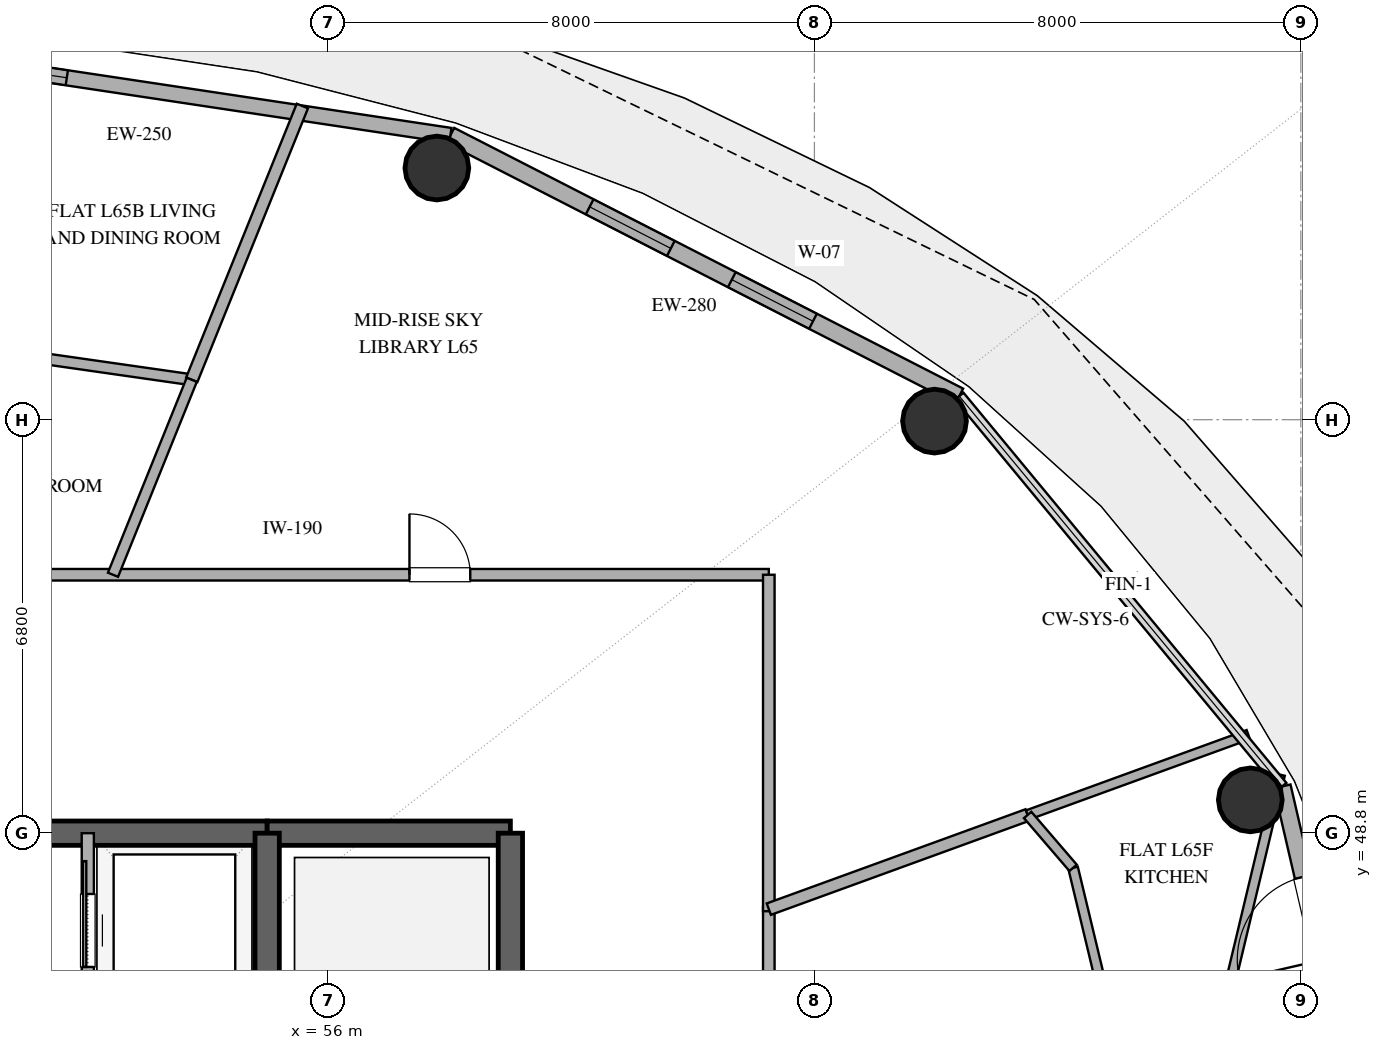
"""IFC4 building model, lengths in metres.
Left out: names, types, materials, properties, quantities, classifications, styles, units other than length and angle.
Written with IfcOpenShell. Run it as: python <this file> out.ifc"""

import sys

from ifc_helpers import new_model, si_unit, direction, frame, frame_2d, origin, origin_2d, place, context, subcontext, project, spatial, rectangle, hollow_circle, extrude, element, fill, save


model = new_model("IFC4")
c1 = context("Model", 3, precision=1e-05, world=origin(), true_north=direction((0.0, 1.0)))
c2 = subcontext(c1, "Body", "Model", "MODEL_VIEW")
j1 = project(units=[si_unit("LENGTHUNIT", "METRE"), si_unit("PLANEANGLEUNIT", "RADIAN")], contexts=[c1])
p1 = place(None, origin())
s1 = spatial("IfcSite", under=j1, at=p1, CompositionType="ELEMENT")
p2 = place(p1, origin())
s2 = spatial("IfcBuilding", under=s1, at=p2, CompositionType="ELEMENT")
p3 = place(p2, frame((0.0, 0.0, 253.2)))
s3 = spatial("IfcBuildingStorey", under=s2, at=p3, CompositionType="ELEMENT", Elevation=253.2)
p4 = place(p3, frame((41.0, 48.8, 0.0), z_axis=(0.0, 0.0, 1.0), x_axis=(1.0, 0.0, 0.0)))
e1 = element("IfcWall", 1, at=p4, inside=s3, PredefinedType="SHEAR", context=c2, shape_type="SweptSolid", body=[
    extrude(rectangle(XDim=14.0, YDim=0.4, at=frame_2d((7.0, 0.0))), origin(), (0.0, 0.0, 1.0), 3.25),
])
p5 = place(p4, frame((6.1, 0.0, 0.0)))
e2 = element("IfcOpeningElement", 2, at=p5, cuts=e1, PredefinedType="OPENING", context=c2, shape_type="SweptSolid", body=[
    extrude(rectangle(XDim=1.8, YDim=2.25, at=frame_2d((0.9, 1.125))), frame((0.0, 0.21, 0.0), z_axis=(0.0, -1.0, 0.0), x_axis=(1.0, 0.0, 0.0)), (0.0, 0.0, 1.0), 0.42),
])
p6 = place(p3, frame((55.0, 48.8, 0.0), z_axis=(0.0, 0.0, 1.0), x_axis=(1.0, 0.0, 0.0)))
e3 = element("IfcWall", 3, at=p6, inside=s3, PredefinedType="SHEAR", context=c2, shape_type="SweptSolid", body=[
    extrude(rectangle(XDim=4.0, YDim=0.4, at=frame_2d((2.0, 0.0))), origin(), (0.0, 0.0, 1.0), 3.25),
])
p7 = place(p3, frame((59.0, 35.2, 0.0), z_axis=(0.0, 0.0, 1.0), x_axis=(0.0, 1.0, 0.0)))
e4 = element("IfcWall", 4, at=p7, inside=s3, PredefinedType="SHEAR", context=c2, shape_type="SweptSolid", body=[
    extrude(rectangle(XDim=13.6, YDim=0.4, at=frame_2d((6.8, 0.0))), origin(), (0.0, 0.0, 1.0), 3.25),
])
p8 = place(p3, frame((55.0, 35.2, 0.0), z_axis=(0.0, 0.0, 1.0), x_axis=(0.0, 1.0, 0.0)))
e5 = element("IfcWall", 5, at=p8, inside=s3, PredefinedType="SHEAR", context=c2, shape_type="SweptSolid", body=[
    extrude(rectangle(XDim=13.6, YDim=0.4, at=frame_2d((6.8, 0.0))), origin(), (0.0, 0.0, 1.0), 3.25),
])
p9 = place(p8, frame((1.15, 0.0, 0.0)))
e6 = element("IfcOpeningElement", 6, at=p9, cuts=e5, PredefinedType="OPENING", context=c2, shape_type="SweptSolid", body=[
    extrude(rectangle(XDim=1.1, YDim=2.2, at=frame_2d((0.55, 1.1))), frame((0.0, 0.21, 0.0), z_axis=(0.0, -1.0, 0.0), x_axis=(1.0, 0.0, 0.0)), (0.0, 0.0, 1.0), 0.42),
])
for number, where, z_axis, x_axis in (
    (7, (71.169, 49.347, 0.0), (0.0, 0.0, 1.0), (1.0, 0.0, 0.0)),
    (8, (65.975, 55.576, 0.0), (0.0, 0.0, 1.0), (1.0, 0.0, 0.0)),
    (9, (57.791, 59.739, 0.0), (0.0, 0.0, 1.0), (1.0, 0.0, 0.0)),
):
    element("IfcColumn", number, at=place(p3, frame(where, z_axis=z_axis, x_axis=x_axis)), inside=s3, PredefinedType="COLUMN", context=c2, shape_type="SweptSolid", body=[
        extrude(hollow_circle(Radius=0.525, WallThickness=0.028, at=origin_2d()), origin(), (0.0, 0.0, 1.0), 3.25),
    ])
p10 = place(p3, frame((73.447, 42.0, 0.0), z_axis=(0.0, 0.0, 1.0), x_axis=(-0.225635078214, 0.974211892495, 0.0)))
e10 = element("IfcWall", 10, at=p10, inside=s3, PredefinedType="SOLIDWALL", context=c2, shape_type="SweptSolid", body=[
    extrude(rectangle(XDim=7.77, YDim=0.28, at=frame_2d((3.885, 0.0))), origin(), (0.0, 0.0, 1.0), 3.25),
])
p11 = place(p10, frame((4.842, 0.0, 0.0)))
e11 = element("IfcOpeningElement", 11, at=p11, cuts=e10, PredefinedType="OPENING", context=c2, shape_type="SweptSolid", body=[
    extrude(rectangle(XDim=1.4, YDim=2.2, at=frame_2d((0.7, 1.1))), frame((0.0, 0.15, 0.0), z_axis=(0.0, -1.0, 0.0), x_axis=(1.0, 0.0, 0.0)), (0.0, 0.0, 1.0), 0.3),
])
p12 = place(p3, frame((66.383, 55.987, 0.0), z_axis=(0.0, 0.0, 1.0), x_axis=(-0.890007394051, 0.455946091699, 0.0)))
e12 = element("IfcWall", 12, at=p12, inside=s3, PredefinedType="SOLIDWALL", context=c2, shape_type="SweptSolid", body=[
    extrude(rectangle(XDim=9.404, YDim=0.28, at=frame_2d((4.702, 0.0))), origin(), (0.0, 0.0, 1.0), 3.25),
])
p13 = place(p12, frame((2.703, 0.0, 0.85)))
e13 = element("IfcOpeningElement", 13, at=p13, cuts=e12, PredefinedType="OPENING", context=c2, shape_type="SweptSolid", body=[
    extrude(rectangle(XDim=1.5, YDim=1.8, at=frame_2d((0.75, 0.9))), frame((0.0, 0.15, 0.0), z_axis=(0.0, -1.0, 0.0), x_axis=(1.0, 0.0, 0.0)), (0.0, 0.0, 1.0), 0.3),
])
p14 = place(p12, frame((5.33, 0.0, 0.85)))
e14 = element("IfcOpeningElement", 14, at=p14, cuts=e12, PredefinedType="OPENING", context=c2, shape_type="SweptSolid", body=[
    extrude(rectangle(XDim=1.5, YDim=1.8, at=frame_2d((0.75, 0.9))), frame((0.0, 0.15, 0.0), z_axis=(0.0, -1.0, 0.0), x_axis=(1.0, 0.0, 0.0)), (0.0, 0.0, 1.0), 0.3),
])
p15 = place(p3, frame((58.013, 60.274, 0.0), z_axis=(0.0, 0.0, 1.0), x_axis=(-0.988882522213, 0.148698881169, 0.0)))
e15 = element("IfcWall", 15, at=p15, inside=s3, PredefinedType="SOLIDWALL", context=c2, shape_type="SweptSolid", body=[
    extrude(rectangle(XDim=10.125, YDim=0.25, at=frame_2d((5.062, 0.0))), origin(), (0.0, 0.0, 1.0), 3.25),
])
p16 = place(p15, frame((6.379, 0.0, 1.42)))
e16 = element("IfcOpeningElement", 16, at=p16, cuts=e15, PredefinedType="OPENING", context=c2, shape_type="SweptSolid", body=[
    extrude(rectangle(XDim=1.0, YDim=1.05, at=frame_2d((0.5, 0.525))), frame((0.0, 0.135, 0.0), z_axis=(0.0, -1.0, 0.0), x_axis=(1.0, 0.0, 0.0)), (0.0, 0.0, 1.0), 0.27),
])
p17 = place(p3, frame((52.05, 38.4, 0.0), z_axis=(0.0, 0.0, 1.0), x_axis=(0.0, 1.0, 0.0)))
e17 = element("IfcWall", 17, at=p17, inside=s3, PredefinedType="SOLIDWALL", context=c2, shape_type="SweptSolid", body=[
    extrude(rectangle(XDim=10.4, YDim=0.2, at=frame_2d((5.2, 0.0))), origin(), (0.0, 0.0, 1.0), 2.61),
])
p18 = place(p17, frame((0.7, 0.0, 0.0)))
e18 = element("IfcOpeningElement", 18, at=p18, cuts=e17, PredefinedType="OPENING", context=c2, shape_type="SweptSolid", body=[
    extrude(rectangle(XDim=1.1, YDim=2.2, at=frame_2d((0.55, 1.1))), frame((0.0, 0.11, 0.0), z_axis=(0.0, -1.0, 0.0), x_axis=(1.0, 0.0, 0.0)), (0.0, 0.0, 1.0), 0.22),
])
p19 = place(p17, frame((8.2, 0.0, 0.0)))
e19 = element("IfcOpeningElement", 19, at=p19, cuts=e17, PredefinedType="OPENING", context=c2, shape_type="SweptSolid", body=[
    extrude(rectangle(XDim=1.2, YDim=2.2, at=frame_2d((0.6, 1.1))), frame((0.0, 0.11, 0.0), z_axis=(0.0, -1.0, 0.0), x_axis=(1.0, 0.0, 0.0)), (0.0, 0.0, 1.0), 0.22),
])
p20 = place(p3, frame((71.658, 49.763, 0.0), z_axis=(0.0, 0.0, 1.0), x_axis=(-0.23242816807, -0.972613564931, 0.0)))
e20 = element("IfcWall", 20, at=p20, inside=s3, PredefinedType="PLUMBINGWALL", context=c2, shape_type="SweptSolid", body=[
    extrude(rectangle(XDim=13.049, YDim=0.16, at=frame_2d((6.524, 0.0))), origin(), (0.0, 0.0, 1.0), 2.61),
])
p21 = place(p20, frame((6.135, 0.0, 0.0)))
e21 = element("IfcOpeningElement", 21, at=p21, cuts=e20, PredefinedType="OPENING", context=c2, shape_type="SweptSolid", body=[
    extrude(rectangle(XDim=0.9, YDim=2.1, at=frame_2d((0.45, 1.05))), frame((0.0, 0.09, 0.0), z_axis=(0.0, -1.0, 0.0), x_axis=(1.0, 0.0, 0.0)), (0.0, 0.0, 1.0), 0.18),
])
p22 = place(p3, frame((47.582, 53.05, 0.0), z_axis=(0.0, 0.0, 1.0), x_axis=(1.0, 0.0, 0.0)))
e22 = element("IfcWall", 22, at=p22, inside=s3, PredefinedType="PARTITIONING", context=c2, shape_type="SweptSolid", body=[
    extrude(rectangle(XDim=15.668, YDim=0.19, at=frame_2d((7.834, 0.0))), origin(), (0.0, 0.0, 1.0), 2.61),
])
p23 = place(p22, frame((9.758, 0.0, 0.0)))
e23 = element("IfcOpeningElement", 23, at=p23, cuts=e22, PredefinedType="OPENING", context=c2, shape_type="SweptSolid", body=[
    extrude(rectangle(XDim=1.0, YDim=2.2, at=frame_2d((0.5, 1.1))), frame((0.0, 0.105, 0.0), z_axis=(0.0, -1.0, 0.0), x_axis=(1.0, 0.0, 0.0)), (0.0, 0.0, 1.0), 0.21),
])
p24 = place(p3, frame((63.25, 47.585, 0.0), z_axis=(0.0, 0.0, 1.0), x_axis=(0.0, -1.0, 0.0)))
e24 = element("IfcWall", 24, at=p24, inside=s3, PredefinedType="PARTITIONING", context=c2, shape_type="SweptSolid", body=[
    extrude(rectangle(XDim=16.635, YDim=0.19, at=frame_2d((8.317, 0.0))), origin(), (0.0, 0.0, 1.0), 2.61),
])
p25 = place(p3, frame((69.753, 42.0, 0.0), z_axis=(0.0, 0.0, 1.0), x_axis=(-0.233901777694, 0.972260231827, 0.0)))
e25 = element("IfcWall", 25, at=p25, inside=s3, PredefinedType="PLUMBINGWALL", context=c2, shape_type="SweptSolid", body=[
    extrude(rectangle(XDim=6.408, YDim=0.16, at=frame_2d((3.204, 0.0))), origin(), (0.0, 0.0, 1.0), 2.61),
])
p26 = place(p3, frame((48.0, 57.08, 0.0), z_axis=(0.0, 0.0, 1.0), x_axis=(0.98992178104, -0.141615209012, 0.0)))
e26 = element("IfcWall", 26, at=p26, inside=s3, PredefinedType="PLUMBINGWALL", context=c2, shape_type="SweptSolid", body=[
    extrude(rectangle(XDim=5.818, YDim=0.18, at=frame_2d((2.909, 0.0))), origin(), (0.0, 0.0, 1.0), 2.61),
])
p27 = place(p26, frame((2.484, 0.0, 0.0)))
e27 = element("IfcOpeningElement", 27, at=p27, cuts=e26, PredefinedType="OPENING", context=c2, shape_type="SweptSolid", body=[
    extrude(rectangle(XDim=0.85, YDim=2.1, at=frame_2d((0.425, 1.05))), frame((0.0, 0.1, 0.0), z_axis=(0.0, -1.0, 0.0), x_axis=(1.0, 0.0, 0.0)), (0.0, 0.0, 1.0), 0.2),
])
p28 = place(p3, frame((63.25, 53.05, 0.0), z_axis=(0.0, 0.0, 1.0), x_axis=(0.0, -1.0, 0.0)))
e28 = element("IfcWall", 28, at=p28, inside=s3, PredefinedType="PARTITIONING", context=c2, shape_type="SweptSolid", body=[
    extrude(rectangle(XDim=5.534, YDim=0.19, at=frame_2d((2.767, 0.0))), origin(), (0.0, 0.0, 1.0), 2.61),
])
p29 = place(p3, frame((55.579, 60.758, 0.0), z_axis=(0.0, 0.0, 1.0), x_axis=(-0.374621823663, -0.927177701002, 0.0)))
e29 = element("IfcWall", 29, at=p29, inside=s3, PredefinedType="PARTITIONING", context=c2, shape_type="SweptSolid", body=[
    extrude(rectangle(XDim=4.856, YDim=0.2, at=frame_2d((2.428, 0.0))), origin(), (0.0, 0.0, 1.0), 2.61),
])
p30 = place(p3, frame((63.25, 47.551, 0.0), z_axis=(0.0, 0.0, 1.0), x_axis=(0.939695825247, 0.342011339012, 0.0)))
e30 = element("IfcWall", 30, at=p30, inside=s3, PredefinedType="PARTITIONING", context=c2, shape_type="SweptSolid", body=[
    extrude(rectangle(XDim=4.53, YDim=0.2, at=frame_2d((2.265, 0.0))), origin(), (0.0, 0.0, 1.0), 2.61),
])
p31 = place(p3, frame((67.507, 49.1, 0.0), z_axis=(0.0, 0.0, 1.0), x_axis=(0.939701103556, 0.341996836208, 0.0)))
e31 = element("IfcWall", 31, at=p31, inside=s3, PredefinedType="PLUMBINGWALL", context=c2, shape_type="SweptSolid", body=[
    extrude(rectangle(XDim=3.862, YDim=0.16, at=frame_2d((1.931, 0.0))), origin(), (0.0, 0.0, 1.0), 2.61),
])
p32 = place(p3, frame((53.76, 56.256, 0.0), z_axis=(0.0, 0.0, 1.0), x_axis=(-0.374565779855, -0.927200343271, 0.0)))
e32 = element("IfcWall", 32, at=p32, inside=s3, PredefinedType="PLUMBINGWALL", context=c2, shape_type="SweptSolid", body=[
    extrude(rectangle(XDim=3.458, YDim=0.18, at=frame_2d((1.729, 0.0))), origin(), (0.0, 0.0, 1.0), 2.61),
])
p33 = place(p3, frame((68.255, 48.23, 0.0), z_axis=(0.0, 0.0, 1.0), x_axis=(-0.651894891584, 0.758309336832, 0.0)))
e33 = element("IfcWall", 33, at=p33, inside=s3, PredefinedType="PLUMBINGWALL", context=c2, shape_type="SweptSolid", body=[
    extrude(rectangle(XDim=1.147, YDim=0.16, at=frame_2d((0.574, 0.0))), origin(), (0.0, 0.0, 1.0), 2.61),
])
p34 = place(p11, origin())
e34 = element("IfcDoor", 34, at=p34, inside=s3, OperationType="SINGLE_SWING_LEFT", PredefinedType="DOOR", context=c2, shape_type="SweptSolid", body=[
    extrude(rectangle(XDim=1.4, YDim=2.2, at=frame_2d((0.7, 1.1))), frame((0.0, 0.025, 0.0), z_axis=(0.0, -1.0, 0.0), x_axis=(1.0, 0.0, 0.0)), (0.0, 0.0, 1.0), 0.05),
])
fill(e11, e34)
p35 = place(p13, origin())
e35 = element("IfcWindow", 35, at=p35, inside=s3, PartitioningType="SINGLE_PANEL", PredefinedType="WINDOW", context=c2, shape_type="SweptSolid", body=[
    extrude(rectangle(XDim=1.5, YDim=1.8, at=frame_2d((0.75, 0.9))), frame((0.0, 0.03, 0.0), z_axis=(0.0, -1.0, 0.0), x_axis=(1.0, 0.0, 0.0)), (0.0, 0.0, 1.0), 0.06),
])
fill(e13, e35)
p36 = place(p14, origin())
e36 = element("IfcWindow", 36, at=p36, inside=s3, PartitioningType="SINGLE_PANEL", PredefinedType="WINDOW", context=c2, shape_type="SweptSolid", body=[
    extrude(rectangle(XDim=1.5, YDim=1.8, at=frame_2d((0.75, 0.9))), frame((0.0, 0.03, 0.0), z_axis=(0.0, -1.0, 0.0), x_axis=(1.0, 0.0, 0.0)), (0.0, 0.0, 1.0), 0.06),
])
fill(e14, e36)
p37 = place(p16, origin())
e37 = element("IfcWindow", 37, at=p37, inside=s3, PartitioningType="SINGLE_PANEL", PredefinedType="WINDOW", context=c2, shape_type="SweptSolid", body=[
    extrude(rectangle(XDim=1.0, YDim=1.05, at=frame_2d((0.5, 0.525))), frame((0.0, 0.03, 0.0), z_axis=(0.0, -1.0, 0.0), x_axis=(1.0, 0.0, 0.0)), (0.0, 0.0, 1.0), 0.06),
])
fill(e16, e37)
p38 = place(p19, origin())
e38 = element("IfcDoor", 38, at=p38, inside=s3, OperationType="SLIDING_TO_RIGHT", PredefinedType="DOOR", context=c2, shape_type="SweptSolid", body=[
    extrude(rectangle(XDim=1.2, YDim=2.2, at=frame_2d((0.6, 1.1))), frame((0.0, 0.025, 0.0), z_axis=(0.0, -1.0, 0.0), x_axis=(1.0, 0.0, 0.0)), (0.0, 0.0, 1.0), 0.05),
])
fill(e19, e38)
p39 = place(p23, origin())
e39 = element("IfcDoor", 39, at=p39, inside=s3, OperationType="SINGLE_SWING_LEFT", PredefinedType="DOOR", context=c2, shape_type="SweptSolid", body=[
    extrude(rectangle(XDim=1.0, YDim=2.2, at=frame_2d((0.5, 1.1))), frame((0.0, 0.025, 0.0), z_axis=(0.0, -1.0, 0.0), x_axis=(1.0, 0.0, 0.0)), (0.0, 0.0, 1.0), 0.05),
])
fill(e23, e39)
save(model, sys.argv[1])
